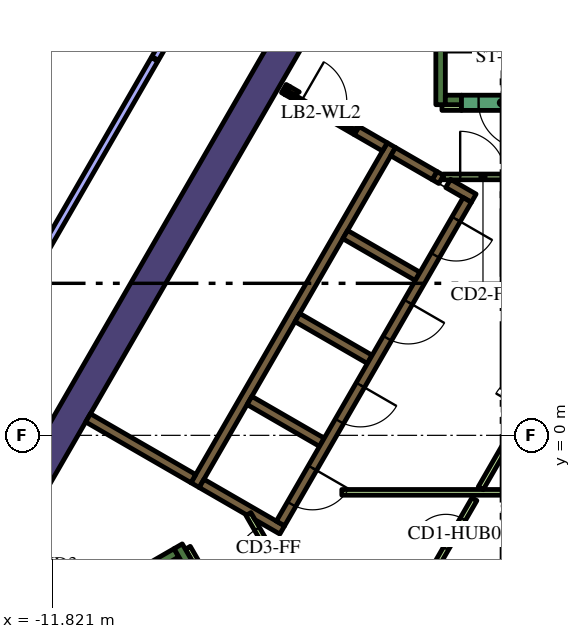
"""IFC4 building model, lengths in metres.
Left out: names, types, materials, properties, quantities, classifications, styles, units other than length and angle.
Written with IfcOpenShell. Run it as: python <this file> out.ifc"""

import sys

from ifc_helpers import new_model, si_unit, direction, frame, frame_2d, origin, place, context, subcontext, project, spatial, polyline, rectangle, outline, extrude, element, fill, save


model = new_model("IFC4")
c1 = context("Model", 3, precision=1e-05, world=origin(), true_north=direction((0.0, 1.0)))
c2 = subcontext(c1, "Body", "Model", "MODEL_VIEW")
j1 = project(units=[si_unit("LENGTHUNIT", "METRE"), si_unit("PLANEANGLEUNIT", "RADIAN")], contexts=[c1])
p1 = place(None, origin())
s1 = spatial("IfcSite", under=j1, at=p1, CompositionType="ELEMENT")
p2 = place(p1, origin())
s2 = spatial("IfcBuilding", under=s1, at=p2, CompositionType="ELEMENT")
p3 = place(p2, frame((0.0, 0.0, 175.2)))
s3 = spatial("IfcBuildingStorey", under=s2, at=p3, CompositionType="ELEMENT", Elevation=175.2)
p4 = place(p3, frame((-12.668, -1.842, 0.0), z_axis=(0.0, 0.0, 1.0), x_axis=(0.500003640647, 0.866023301845, 0.0)))
e1 = element("IfcWall", 1, at=p4, inside=s3, PredefinedType="SOLIDWALL", context=c2, shape_type="SweptSolid", body=[
    extrude(rectangle(XDim=15.858, YDim=0.8, at=frame_2d((7.929, 0.0))), origin(), (0.0, 0.0, 1.0), 4.2),
])
p5 = place(p3, frame((-1.6, 8.7, 0.0), z_axis=(0.0, 0.0, 1.0), x_axis=(0.0, 1.0, 0.0)))
e2 = element("IfcWall", 2, at=p5, inside=s3, PredefinedType="SOLIDWALL", context=c2, shape_type="SweptSolid", body=[
    extrude(rectangle(XDim=7.05, YDim=0.25, at=frame_2d((3.525, 0.0))), origin(), (0.0, 0.0, 1.0), 4.2),
])
p6 = place(p3, frame((-1.475, 8.825, 0.0), z_axis=(0.0, 0.0, 1.0), x_axis=(1.0, 0.0, 0.0)))
e3 = element("IfcWall", 3, at=p6, inside=s3, PredefinedType="SOLIDWALL", context=c2, shape_type="SweptSolid", body=[
    extrude(rectangle(XDim=0.425, YDim=0.25, at=frame_2d((0.212, 0.0))), origin(), (0.0, 0.0, 1.0), 4.2),
])
p7 = place(p3, frame((-14.44, -6.49, 0.0), z_axis=(0.0, 0.0, 1.0), x_axis=(0.866022966069, 0.500004222222, 0.0)))
e4 = element("IfcWall", 4, at=p7, inside=s3, PredefinedType="SOLIDWALL", context=c2, shape_type="SweptSolid", body=[
    extrude(rectangle(XDim=6.8, YDim=0.25, at=frame_2d((3.4, 0.0))), origin(), (0.0, 0.0, 1.0), 4.2),
])
p8 = place(p3, frame((-8.168, -3.503, 0.0), z_axis=(0.0, 0.0, 1.0), x_axis=(-0.499952099219, 0.866053057547, 0.0)))
e5 = element("IfcWall", 5, at=p8, inside=s3, PredefinedType="SOLIDWALL", context=c2, shape_type="SweptSolid", body=[
    extrude(rectangle(XDim=0.675, YDim=0.25, at=frame_2d((0.337, 0.0))), origin(), (0.0, 0.0, 1.0), 4.2),
])
p9 = place(p3, frame((-8.06, -1.311, 0.0), z_axis=(0.0, 0.0, 1.0), x_axis=(0.50000273126, 0.866023826885, 0.0)))
e6 = element("IfcWall", 6, at=p9, inside=s3, PredefinedType="SOLIDWALL", context=c2, shape_type="SweptSolid", body=[
    extrude(rectangle(XDim=10.33, YDim=0.25, at=frame_2d((5.165, 0.0))), origin(), (0.0, 0.0, 1.0), 4.2),
])
p10 = place(p3, frame((-1.758, 6.835, 0.0), z_axis=(0.0, 0.0, 1.0), x_axis=(0.865982457891, -0.500074377092, 0.0)))
e7 = element("IfcWall", 7, at=p10, inside=s3, PredefinedType="SOLIDWALL", context=c2, shape_type="SweptSolid", body=[
    extrude(rectangle(XDim=0.2, YDim=0.25, at=frame_2d((0.1, 0.0))), origin(), (0.0, 0.0, 1.0), 4.2),
])
p11 = place(p3, frame((-1.76, 6.836, 0.0), z_axis=(0.0, 0.0, 1.0), x_axis=(-0.865952863304, 0.500125622755, 0.0)))
e8 = element("IfcWall", 8, at=p11, inside=s3, PredefinedType="SOLIDWALL", context=c2, shape_type="SweptSolid", body=[
    extrude(rectangle(XDim=1.258, YDim=0.25, at=frame_2d((0.629, 0.0))), origin(), (0.0, 0.0, 1.0), 4.2),
])
p12 = place(p3, frame((-0.728, 6.24, 0.0), z_axis=(0.0, 0.0, 1.0), x_axis=(-0.865955664968, 0.500120771724, 0.0)))
e9 = element("IfcWall", 9, at=p12, inside=s3, PredefinedType="SOLIDWALL", context=c2, shape_type="SweptSolid", body=[
    extrude(rectangle(XDim=0.778, YDim=0.25, at=frame_2d((0.389, 0.0))), origin(), (0.0, 0.0, 1.0), 4.2),
])
for number, where, z_axis, x_axis in (
    (10, (-2.204, 4.182, 0.0), (0.0, 0.0, 1.0), (-0.866, 0.5, 0.0)),
    (11, (-5.369, 3.1, 0.0), (0.0, 0.0, 1.0), (0.866, -0.5, 0.0)),
    (12, (-4.724, -0.182, 0.0), (0.0, 0.0, 1.0), (-0.866, 0.5, 0.0)),
):
    element("IfcWall", number, at=place(p3, frame(where, z_axis=z_axis, x_axis=x_axis)), inside=s3, PredefinedType="SOLIDWALL", context=c2, shape_type="SweptSolid", body=[
        extrude(rectangle(XDim=2.2, YDim=0.25, at=frame_2d((1.1, 0.0))), origin(), (0.0, 0.0, 1.0), 4.2),
    ])
p13 = place(p3, origin())
e13 = element("IfcWall", 13, at=p13, inside=s3, PredefinedType="SOLIDWALL", context=c2, shape_type="SweptSolid", body=[
    extrude(outline(polyline([(-5.922, -2.257), (-5.922, -2.257), (-5.705, -2.382), (-5.83, -2.598), (-6.483, -2.221), (-6.591, -2.033), (-6.591, -2.033), (-6.7, -2.096), (-7.952, -1.373), (-7.827, -1.156), (-5.922, -2.257)])), origin(), (0.0, 0.0, 1.0), 4.2),
])
p14 = place(p3, frame((-8.106, -1.14, 0.0), z_axis=(0.0, 0.0, 1.0), x_axis=(-0.866008981251, 0.500028443584, 0.0)))
e14 = element("IfcWall", 14, at=p14, inside=s3, PredefinedType="SOLIDWALL", context=c2, shape_type="SweptSolid", body=[
    extrude(rectangle(XDim=3.2, YDim=0.25, at=frame_2d((1.6, 0.0))), origin(), (0.0, 0.0, 1.0), 4.2),
])
p15 = place(p3, frame((-5.725, 9.125, 0.0), z_axis=(0.0, 0.0, 1.0), x_axis=(0.866185586049, -0.49972245349, 0.0)))
e15 = element("IfcWall", 15, at=p15, inside=s3, PredefinedType="SOLIDWALL", context=c2, shape_type="SweptSolid", body=[
    extrude(rectangle(XDim=0.11, YDim=0.25, at=frame_2d((0.055, 0.0))), origin(), (0.0, 0.0, 1.0), 4.2),
])
p16 = place(p3, frame((-3.066, 7.59, 0.0), z_axis=(0.0, 0.0, 1.0), x_axis=(-0.866081358704, 0.49990307071, 0.0)))
e16 = element("IfcWall", 16, at=p16, inside=s3, PredefinedType="SOLIDWALL", context=c2, shape_type="SweptSolid", body=[
    extrude(rectangle(XDim=0.858, YDim=0.25, at=frame_2d((0.429, 0.0))), origin(), (0.0, 0.0, 1.0), 4.2),
])
e17 = element("IfcWall", 17, at=p13, inside=s3, PredefinedType="SOLIDWALL", context=c2, shape_type="SweptSolid", body=[
    extrude(outline(polyline([(-3.748, 8.128), (-3.813, 8.015), (-4.027, 8.139), (-4.017, 8.156), (-4.008, 8.173), (-4.0, 8.192), (-3.995, 8.21), (-3.991, 8.23), (-3.99, 8.25), (-3.99, 8.268), (-3.748, 8.128)])), origin(), (0.0, 0.0, 1.0), 4.2),
])
e18 = element("IfcWall", 18, at=p13, inside=s3, PredefinedType="SOLIDWALL", context=c2, shape_type="SweptSolid", body=[
    extrude(outline(polyline([(-5.689, 8.96), (-5.69, 8.961), (-5.565, 9.177), (-5.319, 9.035), (-5.335, 9.026), (-5.351, 9.015), (-5.366, 9.002), (-5.379, 8.988), (-5.392, 8.972), (-5.402, 8.956), (-5.412, 8.939), (-5.629, 9.064), (-5.629, 9.064), (-5.689, 8.96)])), origin(), (0.0, 0.0, 1.0), 4.2),
])
for number, where, z_axis, x_axis in (
    (19, (-8.252, -2.958, 0.0), (0.0, 0.0, 1.0), (0.5, -0.866, 0.0)),
    (20, (-1.564, 8.625, 0.0), (0.0, 0.0, 1.0), (1.0, 0.0, 0.0)),
):
    element("IfcWall", number, at=place(p3, frame(where, z_axis=z_axis, x_axis=x_axis)), inside=s3, PredefinedType="PARTITIONING", context=c2, shape_type="SweptSolid", body=[
        extrude(rectangle(XDim=0.514, YDim=0.15, at=frame_2d((0.257, 0.0))), origin(), (0.0, 0.0, 1.0), 3.15),
    ])
p17 = place(p3, frame((-4.2, -1.5, 0.0), z_axis=(0.0, 0.0, 1.0), x_axis=(1.0, 0.0, 0.0)))
e21 = element("IfcWall", 21, at=p17, inside=s3, PredefinedType="PARTITIONING", context=c2, shape_type="SweptSolid", body=[
    extrude(rectangle(XDim=9.359, YDim=0.15, at=frame_2d((4.68, 0.0))), origin(), (0.0, 0.0, 1.0), 3.15),
])
p18 = place(p3, frame((-0.544, -1.393, 0.0), z_axis=(0.0, 0.0, 1.0), x_axis=(0.499928740635, 0.866066541489, 0.0)))
e22 = element("IfcWall", 22, at=p18, inside=s3, PredefinedType="PARTITIONING", context=c2, shape_type="SweptSolid", body=[
    extrude(rectangle(XDim=1.912, YDim=0.15, at=frame_2d((0.956, 0.0))), origin(), (0.0, 0.0, 1.0), 3.15),
])
p19 = place(p3, frame((-0.898, 6.194, 0.0), z_axis=(0.0, 0.0, 1.0), x_axis=(-0.499996202215, -0.866027596426, 0.0)))
e23 = element("IfcWall", 23, at=p19, inside=s3, PredefinedType="SOLIDWALL", context=c2, shape_type="SweptSolid", body=[
    extrude(rectangle(XDim=9.83, YDim=0.25, at=frame_2d((4.915, 0.0))), origin(), (0.0, 0.0, 1.0), 4.2),
])
p20 = place(p19, frame((0.585, 0.0, 0.0)))
e24 = element("IfcOpeningElement", 24, at=p20, cuts=e23, PredefinedType="OPENING", context=c2, shape_type="SweptSolid", body=[
    extrude(rectangle(XDim=1.1, YDim=2.1, at=frame_2d((0.55, 1.05))), frame((0.0, 0.135, 0.0), z_axis=(0.0, -1.0, 0.0), x_axis=(1.0, 0.0, 0.0)), (0.0, 0.0, 1.0), 0.27),
])
p21 = place(p19, frame((3.105, 0.0, 0.0)))
e25 = element("IfcOpeningElement", 25, at=p21, cuts=e23, PredefinedType="OPENING", context=c2, shape_type="SweptSolid", body=[
    extrude(rectangle(XDim=1.1, YDim=2.1, at=frame_2d((0.55, 1.05))), frame((0.0, 0.135, 0.0), z_axis=(0.0, -1.0, 0.0), x_axis=(1.0, 0.0, 0.0)), (0.0, 0.0, 1.0), 0.27),
])
p22 = place(p19, frame((5.625, 0.0, 0.0)))
e26 = element("IfcOpeningElement", 26, at=p22, cuts=e23, PredefinedType="OPENING", context=c2, shape_type="SweptSolid", body=[
    extrude(rectangle(XDim=1.1, YDim=2.1, at=frame_2d((0.55, 1.05))), frame((0.0, 0.135, 0.0), z_axis=(0.0, -1.0, 0.0), x_axis=(1.0, 0.0, 0.0)), (0.0, 0.0, 1.0), 0.27),
])
p23 = place(p19, frame((8.145, 0.0, 0.0)))
e27 = element("IfcOpeningElement", 27, at=p23, cuts=e23, PredefinedType="OPENING", context=c2, shape_type="SweptSolid", body=[
    extrude(rectangle(XDim=1.1, YDim=2.1, at=frame_2d((0.55, 1.05))), frame((0.0, 0.135, 0.0), z_axis=(0.0, -1.0, 0.0), x_axis=(1.0, 0.0, 0.0)), (0.0, 0.0, 1.0), 0.27),
])
p24 = place(p3, frame((1.05, 8.75, 0.0), z_axis=(0.0, 0.0, 1.0), x_axis=(-1.0, 0.0, 0.0)))
e28 = element("IfcWall", 28, at=p24, inside=s3, PredefinedType="SOLIDWALL", context=c2, shape_type="SweptSolid", body=[
    extrude(rectangle(XDim=2.1, YDim=0.4, at=frame_2d((1.05, 0.0))), origin(), (0.0, 0.0, 1.0), 4.2),
])
p25 = place(p24, frame((0.45, 0.0, 0.0)))
e29 = element("IfcOpeningElement", 29, at=p25, cuts=e28, PredefinedType="OPENING", context=c2, shape_type="SweptSolid", body=[
    extrude(rectangle(XDim=1.2, YDim=2.1, at=frame_2d((0.6, 1.05))), frame((0.0, 0.21, 0.0), z_axis=(0.0, -1.0, 0.0), x_axis=(1.0, 0.0, 0.0)), (0.0, 0.0, 1.0), 0.42),
])
p26 = place(p3, frame((-1.76, -3.498, 0.0), z_axis=(0.0, 0.0, 1.0), x_axis=(0.499977374825, 0.866038466041, 0.0)))
e30 = element("IfcWall", 30, at=p26, inside=s3, PredefinedType="PARTITIONING", context=c2, shape_type="SweptSolid", body=[
    extrude(rectangle(XDim=2.1, YDim=0.15, at=frame_2d((1.05, 0.0))), origin(), (0.0, 0.0, 1.0), 3.15),
])
p27 = place(p26, frame((0.6, 0.0, 0.0)))
e31 = element("IfcOpeningElement", 31, at=p27, cuts=e30, PredefinedType="OPENING", context=c2, shape_type="SweptSolid", body=[
    extrude(rectangle(XDim=0.9, YDim=2.1, at=frame_2d((0.45, 1.05))), frame((0.0, 0.085, 0.0), z_axis=(0.0, -1.0, 0.0), x_axis=(1.0, 0.0, 0.0)), (0.0, 0.0, 1.0), 0.17),
])
p28 = place(p3, frame((-1.534, 6.8, 0.0), z_axis=(0.0, 0.0, 1.0), x_axis=(1.0, 0.0, 0.0)))
e32 = element("IfcWall", 32, at=p28, inside=s3, PredefinedType="PARTITIONING", context=c2, shape_type="SweptSolid", body=[
    extrude(rectangle(XDim=2.1, YDim=0.15, at=frame_2d((1.05, 0.0))), origin(), (0.0, 0.0, 1.0), 3.15),
])
p29 = place(p28, frame((0.45, 0.0, 0.0)))
e33 = element("IfcOpeningElement", 33, at=p29, cuts=e32, PredefinedType="OPENING", context=c2, shape_type="SweptSolid", body=[
    extrude(rectangle(XDim=1.2, YDim=2.1, at=frame_2d((0.6, 1.05))), frame((0.0, 0.085, 0.0), z_axis=(0.0, -1.0, 0.0), x_axis=(1.0, 0.0, 0.0)), (0.0, 0.0, 1.0), 0.17),
])
p30 = place(p3, frame((-5.606, -3.89, 0.0), z_axis=(0.0, 0.0, 1.0), x_axis=(-0.500027713859, 0.866009402589, 0.0)))
e34 = element("IfcWall", 34, at=p30, inside=s3, PredefinedType="PARTITIONING", context=c2, shape_type="SweptSolid", body=[
    extrude(rectangle(XDim=2.1, YDim=0.15, at=frame_2d((1.05, 0.0))), origin(), (0.0, 0.0, 1.0), 3.15),
])
p31 = place(p30, frame((0.45, 0.0, 0.0)))
e35 = element("IfcOpeningElement", 35, at=p31, cuts=e34, PredefinedType="OPENING", context=c2, shape_type="SweptSolid", body=[
    extrude(rectangle(XDim=1.2, YDim=2.1, at=frame_2d((0.6, 1.05))), frame((0.0, 0.085, 0.0), z_axis=(0.0, -1.0, 0.0), x_axis=(1.0, 0.0, 0.0)), (0.0, 0.0, 1.0), 0.17),
])
p32 = place(p3, frame((-5.659, 9.012, 0.0), z_axis=(0.0, 0.0, 1.0), x_axis=(0.866009402589, -0.500027713859, 0.0)))
e36 = element("IfcWall", 36, at=p32, inside=s3, PredefinedType="PARTITIONING", context=c2, shape_type="SweptSolid", body=[
    extrude(rectangle(XDim=2.1, YDim=0.12, at=frame_2d((1.05, 0.0))), origin(), (0.0, 0.0, 1.0), 3.15),
])
p33 = place(p32, frame((0.45, 0.0, 0.0)))
e37 = element("IfcOpeningElement", 37, at=p33, cuts=e36, PredefinedType="OPENING", context=c2, shape_type="SweptSolid", body=[
    extrude(rectangle(XDim=1.2, YDim=2.1, at=frame_2d((0.6, 1.05))), frame((0.0, 0.07, 0.0), z_axis=(0.0, -1.0, 0.0), x_axis=(1.0, 0.0, 0.0)), (0.0, 0.0, 1.0), 0.14),
])
p34 = place(p3, frame((-9.126, 9.893, 0.0), z_axis=(0.0, 0.0, 1.0), x_axis=(-0.499995158272, -0.866028199139, 0.0)))
e38 = element("IfcWall", 38, at=p34, inside=s3, PredefinedType="PARTITIONING", context=c2, shape_type="SweptSolid", body=[
    extrude(rectangle(XDim=8.008, YDim=0.2, at=frame_2d((4.004, 0.0))), origin(), (0.0, 0.0, 1.0), 3.15),
])
p35 = place(p3, frame((-4.757, 17.461, 0.0), z_axis=(0.0, 0.0, 1.0), x_axis=(-0.499998278779, -0.866026397529, 0.0)))
e39 = element("IfcWall", 39, at=p35, inside=s3, PredefinedType="PARTITIONING", context=c2, shape_type="SweptSolid", body=[
    extrude(rectangle(XDim=8.709, YDim=0.2, at=frame_2d((4.354, 0.0))), origin(), (0.0, 0.0, 1.0), 3.15),
])
p36 = place(p20, origin())
e40 = element("IfcDoor", 40, at=p36, inside=s3, OperationType="DOUBLE_DOOR_SLIDING", PredefinedType="DOOR", context=c2, shape_type="SweptSolid", body=[
    extrude(rectangle(XDim=1.1, YDim=2.1, at=frame_2d((0.55, 1.05))), frame((0.0, 0.025, 0.0), z_axis=(0.0, -1.0, 0.0), x_axis=(1.0, 0.0, 0.0)), (0.0, 0.0, 1.0), 0.05),
])
fill(e24, e40)
p37 = place(p21, origin())
e41 = element("IfcDoor", 41, at=p37, inside=s3, OperationType="DOUBLE_DOOR_SLIDING", PredefinedType="DOOR", context=c2, shape_type="SweptSolid", body=[
    extrude(rectangle(XDim=1.1, YDim=2.1, at=frame_2d((0.55, 1.05))), frame((0.0, 0.025, 0.0), z_axis=(0.0, -1.0, 0.0), x_axis=(1.0, 0.0, 0.0)), (0.0, 0.0, 1.0), 0.05),
])
fill(e25, e41)
p38 = place(p22, origin())
e42 = element("IfcDoor", 42, at=p38, inside=s3, OperationType="DOUBLE_DOOR_SLIDING", PredefinedType="DOOR", context=c2, shape_type="SweptSolid", body=[
    extrude(rectangle(XDim=1.1, YDim=2.1, at=frame_2d((0.55, 1.05))), frame((0.0, 0.025, 0.0), z_axis=(0.0, -1.0, 0.0), x_axis=(1.0, 0.0, 0.0)), (0.0, 0.0, 1.0), 0.05),
])
fill(e26, e42)
p39 = place(p23, origin())
e43 = element("IfcDoor", 43, at=p39, inside=s3, OperationType="DOUBLE_DOOR_SLIDING", PredefinedType="DOOR", context=c2, shape_type="SweptSolid", body=[
    extrude(rectangle(XDim=1.1, YDim=2.1, at=frame_2d((0.55, 1.05))), frame((0.0, 0.025, 0.0), z_axis=(0.0, -1.0, 0.0), x_axis=(1.0, 0.0, 0.0)), (0.0, 0.0, 1.0), 0.05),
])
fill(e27, e43)
p40 = place(p25, origin())
e44 = element("IfcDoor", 44, at=p40, inside=s3, OperationType="SINGLE_SWING_LEFT", PredefinedType="DOOR", context=c2, shape_type="SweptSolid", body=[
    extrude(rectangle(XDim=1.2, YDim=2.1, at=frame_2d((0.6, 1.05))), frame((0.0, 0.025, 0.0), z_axis=(0.0, -1.0, 0.0), x_axis=(1.0, 0.0, 0.0)), (0.0, 0.0, 1.0), 0.05),
])
fill(e29, e44)
p41 = place(p27, origin())
e45 = element("IfcDoor", 45, at=p41, inside=s3, OperationType="SINGLE_SWING_LEFT", PredefinedType="DOOR", context=c2, shape_type="SweptSolid", body=[
    extrude(rectangle(XDim=0.9, YDim=2.1, at=frame_2d((0.45, 1.05))), frame((0.0, 0.025, 0.0), z_axis=(0.0, -1.0, 0.0), x_axis=(1.0, 0.0, 0.0)), (0.0, 0.0, 1.0), 0.05),
])
fill(e31, e45)
p42 = place(p29, origin())
e46 = element("IfcDoor", 46, at=p42, inside=s3, OperationType="SINGLE_SWING_LEFT", PredefinedType="DOOR", context=c2, shape_type="SweptSolid", body=[
    extrude(rectangle(XDim=1.2, YDim=2.1, at=frame_2d((0.6, 1.05))), frame((0.0, 0.025, 0.0), z_axis=(0.0, -1.0, 0.0), x_axis=(1.0, 0.0, 0.0)), (0.0, 0.0, 1.0), 0.05),
])
fill(e33, e46)
p43 = place(p31, origin())
e47 = element("IfcDoor", 47, at=p43, inside=s3, OperationType="SINGLE_SWING_LEFT", PredefinedType="DOOR", context=c2, shape_type="SweptSolid", body=[
    extrude(rectangle(XDim=1.2, YDim=2.1, at=frame_2d((0.6, 1.05))), frame((0.0, 0.025, 0.0), z_axis=(0.0, -1.0, 0.0), x_axis=(1.0, 0.0, 0.0)), (0.0, 0.0, 1.0), 0.05),
])
fill(e35, e47)
p44 = place(p33, origin())
e48 = element("IfcDoor", 48, at=p44, inside=s3, OperationType="SINGLE_SWING_LEFT", PredefinedType="DOOR", context=c2, shape_type="SweptSolid", body=[
    extrude(rectangle(XDim=1.2, YDim=2.1, at=frame_2d((0.6, 1.05))), frame((0.0, 0.025, 0.0), z_axis=(0.0, -1.0, 0.0), x_axis=(1.0, 0.0, 0.0)), (0.0, 0.0, 1.0), 0.05),
])
fill(e37, e48)
save(model, sys.argv[1])
